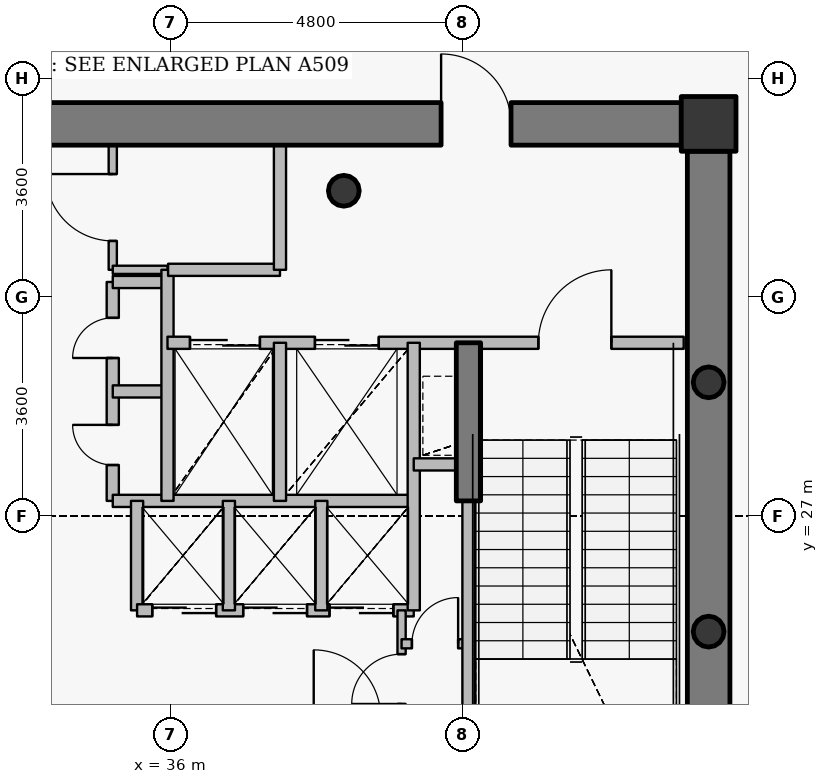
"""IFC4 building model, lengths in metres.
Left out: names, types, materials, properties, quantities, classifications, styles, units other than length and angle.
Written with IfcOpenShell. Run it as: python <this file> out.ifc"""

import sys

from ifc_helpers import new_model, si_unit, direction, frame, frame_2d, origin, origin_2d, place, context, subcontext, project, spatial, rectangle, hollow_circle, extrude, source, transform, mapped, element, fill, save


model = new_model("IFC4")
c1 = context("Model", 3, precision=1e-05, world=origin(), true_north=direction((0.0, 1.0)))
c2 = subcontext(c1, "Body", "Model", "MODEL_VIEW")
j1 = project(units=[si_unit("LENGTHUNIT", "METRE"), si_unit("PLANEANGLEUNIT", "RADIAN")], contexts=[c1])
p1 = place(None, origin())
s1 = spatial("IfcSite", under=j1, at=p1, CompositionType="ELEMENT")
p2 = place(p1, origin())
s2 = spatial("IfcBuilding", under=s1, at=p2, CompositionType="ELEMENT")
p3 = place(p2, frame((0.0, 0.0, 324.0)))
s3 = spatial("IfcBuildingStorey", under=s2, at=p3, CompositionType="ELEMENT", Elevation=324.0)
p4 = place(p3, frame((44.85, 33.45, 0.0), z_axis=(0.0, 0.0, 1.0), x_axis=(1.0, 0.0, 0.0)))
e1 = element("IfcColumn", 1, at=p4, inside=s3, PredefinedType="COLUMN", context=c2, shape_type="SweptSolid", body=[
    extrude(rectangle(XDim=0.9, YDim=0.9, at=origin_2d()), origin(), (0.0, 0.0, 1.0), 3.8),
])
p5 = place(p3, frame((38.85, 32.35, 0.0), z_axis=(0.0, 0.0, 1.0), x_axis=(1.0, 0.0, 0.0)))
e2 = element("IfcColumn", 2, at=p5, inside=s3, PredefinedType="COLUMN", context=c2, shape_type="SweptSolid", body=[
    extrude(hollow_circle(Radius=0.254, WallThickness=0.02, at=origin_2d()), origin(), (0.0, 0.0, 1.0), 3.8),
])
p6 = place(p3, frame((27.6, 33.45, 0.0), z_axis=(0.0, 0.0, 1.0), x_axis=(1.0, 0.0, 0.0)))
e3 = element("IfcWall", 3, at=p6, inside=s3, PredefinedType="SHEAR", context=c2, shape_type="SweptSolid", body=[
    extrude(rectangle(XDim=16.8, YDim=0.7, at=frame_2d((8.4, 0.0))), origin(), (0.0, 0.0, 1.0), 3.1),
])
p7 = place(p6, frame((12.85, 0.0, 0.0)))
e4 = element("IfcOpeningElement", 4, at=p7, cuts=e3, PredefinedType="OPENING", context=c2, shape_type="SweptSolid", body=[
    extrude(rectangle(XDim=1.15, YDim=2.15, at=origin_2d()), frame((0.575, 0.36, 1.075), z_axis=(0.0, -1.0, 0.0), x_axis=(1.0, 0.0, 0.0)), (0.0, 0.0, 1.0), 0.72),
])
p8 = place(p3, frame((44.85, 33.0, 0.0), z_axis=(0.0, 0.0, 1.0), x_axis=(0.0, -1.0, 0.0)))
e5 = element("IfcWall", 5, at=p8, inside=s3, PredefinedType="SHEAR", context=c2, shape_type="SweptSolid", body=[
    extrude(rectangle(XDim=12.0, YDim=0.7, at=frame_2d((6.0, 0.0))), origin(), (0.0, 0.0, 1.0), 3.1),
])
p9 = place(p3, frame((40.9, 27.25, 0.0), z_axis=(0.0, 0.0, 1.0), x_axis=(0.0, 1.0, 0.0)))
e6 = element("IfcWall", 6, at=p9, inside=s3, PredefinedType="SHEAR", context=c2, shape_type="SweptSolid", body=[
    extrude(rectangle(XDim=2.6, YDim=0.4, at=frame_2d((1.3, 0.0))), origin(), (0.0, 0.0, 1.0), 3.15),
])
for number, where, z_axis, x_axis in (
    (7, (44.85, 25.1, 0.0), (0.0, 0.0, 1.0), (1.0, 0.0, 0.0)),
    (8, (44.85, 29.2, 0.0), (0.0, 0.0, 1.0), (1.0, 0.0, 0.0)),
):
    element("IfcColumn", number, at=place(p3, frame(where, z_axis=z_axis, x_axis=x_axis)), inside=s3, PredefinedType="COLUMN", context=c2, shape_type="SweptSolid", body=[
        extrude(hollow_circle(Radius=0.254, WallThickness=0.02, at=origin_2d()), origin(), (0.0, 0.0, 1.0), 3.8),
    ])
p10 = place(p3, frame((35.05, 27.25, 0.0), z_axis=(0.0, 0.0, 1.0), x_axis=(0.0, 1.0, 0.0)))
e9 = element("IfcWall", 9, at=p10, inside=s3, PredefinedType="PARTITIONING", context=c2, shape_type="SweptSolid", body=[
    extrude(rectangle(XDim=3.6, YDim=0.2, at=frame_2d((1.8, 0.0))), origin(), (0.0, 0.0, 1.0), 3.55),
])
p11 = place(p10, frame((0.59, 0.0, 0.0)))
e10 = element("IfcOpeningElement", 10, at=p11, cuts=e9, PredefinedType="OPENING", context=c2, shape_type="SweptSolid", body=[
    extrude(rectangle(XDim=0.66, YDim=2.05, at=origin_2d()), frame((0.33, 0.11, 1.025), z_axis=(0.0, -1.0, 0.0), x_axis=(1.0, 0.0, 0.0)), (0.0, 0.0, 1.0), 0.22),
])
p12 = place(p10, frame((2.35, 0.0, 0.0)))
e11 = element("IfcOpeningElement", 11, at=p12, cuts=e9, PredefinedType="OPENING", context=c2, shape_type="SweptSolid", body=[
    extrude(rectangle(XDim=0.66, YDim=2.05, at=origin_2d()), frame((0.33, 0.11, 1.025), z_axis=(0.0, -1.0, 0.0), x_axis=(1.0, 0.0, 0.0)), (0.0, 0.0, 1.0), 0.22),
])
p13 = place(p3, frame((35.05, 27.25, 0.0), z_axis=(0.0, 0.0, 1.0), x_axis=(1.0, 0.0, 0.0)))
e12 = element("IfcWall", 12, at=p13, inside=s3, PredefinedType="PARTITIONING", context=c2, shape_type="SweptSolid", body=[
    extrude(rectangle(XDim=4.95, YDim=0.2, at=frame_2d((2.475, 0.0))), origin(), (0.0, 0.0, 1.0), 3.135),
])
for number, where, z_axis, x_axis in (
    (13, (35.05, 29.05, 0.0), (0.0, 0.0, 1.0), (1.0, 0.0, 0.0)),
    (14, (35.05, 30.85, 0.0), (0.0, 0.0, 1.0), (1.0, 0.0, 0.0)),
):
    element("IfcWall", number, at=place(p3, frame(where, z_axis=z_axis, x_axis=x_axis)), inside=s3, PredefinedType="PARTITIONING", context=c2, shape_type="SweptSolid", body=[
        extrude(rectangle(XDim=0.9, YDim=0.2, at=frame_2d((0.45, 0.0))), origin(), (0.0, 0.0, 1.0), 3.55),
    ])
p14 = place(p3, frame((35.05, 31.05, 0.0), z_axis=(0.0, 0.0, 1.0), x_axis=(0.0, 1.0, 0.0)))
e15 = element("IfcWall", 15, at=p14, inside=s3, PredefinedType="PARTITIONING", context=c2, shape_type="SweptSolid", body=[
    extrude(rectangle(XDim=2.05, YDim=0.135, at=frame_2d((1.025, 0.0))), origin(), (0.0, 0.0, 1.0), 3.135),
])
p15 = place(p14, frame((0.475, 0.0, 0.0)))
e16 = element("IfcOpeningElement", 16, at=p15, cuts=e15, PredefinedType="OPENING", context=c2, shape_type="SweptSolid", body=[
    extrude(rectangle(XDim=1.1, YDim=2.15, at=origin_2d()), frame((0.55, 0.078, 1.075), z_axis=(0.0, -1.0, 0.0), x_axis=(1.0, 0.0, 0.0)), (0.0, 0.0, 1.0), 0.155),
])
p16 = place(p3, frame((35.05, 31.05, 0.0), z_axis=(0.0, 0.0, 1.0), x_axis=(1.0, 0.0, 0.0)))
e17 = element("IfcWall", 17, at=p16, inside=s3, PredefinedType="PARTITIONING", context=c2, shape_type="SweptSolid", body=[
    extrude(rectangle(XDim=0.9, YDim=0.135, at=frame_2d((0.45, 0.0))), origin(), (0.0, 0.0, 1.0), 3.55),
])
p17 = place(p3, frame((35.45, 25.45, 0.0), z_axis=(0.0, 0.0, 1.0), x_axis=(0.0, 1.0, 0.0)))
e18 = element("IfcWall", 18, at=p17, inside=s3, PredefinedType="PARTITIONING", context=c2, shape_type="SweptSolid", body=[
    extrude(rectangle(XDim=1.8, YDim=0.2, at=frame_2d((0.9, 0.0))), origin(), (0.0, 0.0, 1.0), 3.55),
])
p18 = place(p3, frame((35.45, 25.45, 0.0), z_axis=(0.0, 0.0, 1.0), x_axis=(1.0, 0.0, 0.0)))
e19 = element("IfcWall", 19, at=p18, inside=s3, PredefinedType="PARTITIONING", context=c2, shape_type="SweptSolid", body=[
    extrude(rectangle(XDim=4.55, YDim=0.2, at=frame_2d((2.275, 0.0))), origin(), (0.0, 0.0, 1.0), 3.135),
])
p19 = place(p18, frame((0.25, 0.0, 0.0)))
e20 = element("IfcOpeningElement", 20, at=p19, cuts=e19, PredefinedType="OPENING", context=c2, shape_type="SweptSolid", body=[
    extrude(rectangle(XDim=1.05, YDim=2.15, at=origin_2d()), frame((0.525, 0.11, 1.075), z_axis=(0.0, -1.0, 0.0), x_axis=(1.0, 0.0, 0.0)), (0.0, 0.0, 1.0), 0.22),
])
p20 = place(p18, frame((1.745, 0.0, 0.0)))
e21 = element("IfcOpeningElement", 21, at=p20, cuts=e19, PredefinedType="OPENING", context=c2, shape_type="SweptSolid", body=[
    extrude(rectangle(XDim=1.05, YDim=2.15, at=origin_2d()), frame((0.525, 0.11, 1.075), z_axis=(0.0, -1.0, 0.0), x_axis=(1.0, 0.0, 0.0)), (0.0, 0.0, 1.0), 0.22),
])
p21 = place(p18, frame((3.165, 0.0, 0.0)))
e22 = element("IfcOpeningElement", 22, at=p21, cuts=e19, PredefinedType="OPENING", context=c2, shape_type="SweptSolid", body=[
    extrude(rectangle(XDim=1.05, YDim=2.15, at=origin_2d()), frame((0.525, 0.11, 1.075), z_axis=(0.0, -1.0, 0.0), x_axis=(1.0, 0.0, 0.0)), (0.0, 0.0, 1.0), 0.22),
])
p22 = place(p3, frame((35.95, 27.25, 0.0), z_axis=(0.0, 0.0, 1.0), x_axis=(0.0, 1.0, 0.0)))
e23 = element("IfcWall", 23, at=p22, inside=s3, PredefinedType="PARTITIONING", context=c2, shape_type="SweptSolid", body=[
    extrude(rectangle(XDim=3.8, YDim=0.2, at=frame_2d((1.9, 0.0))), origin(), (0.0, 0.0, 1.0), 3.55),
])
p23 = place(p3, frame((35.95, 29.85, 0.0), z_axis=(0.0, 0.0, 1.0), x_axis=(1.0, 0.0, 0.0)))
e24 = element("IfcWall", 24, at=p23, inside=s3, PredefinedType="PARTITIONING", context=c2, shape_type="SweptSolid", body=[
    extrude(rectangle(XDim=8.49, YDim=0.2, at=frame_2d((4.245, 0.0))), origin(), (0.0, 0.0, 1.0), 3.135),
])
p24 = place(p23, frame((6.1, 0.0, 0.0)))
e25 = element("IfcOpeningElement", 25, at=p24, cuts=e24, PredefinedType="OPENING", context=c2, shape_type="SweptSolid", body=[
    extrude(rectangle(XDim=1.2, YDim=2.15, at=origin_2d()), frame((0.6, 0.11, 1.075), z_axis=(0.0, -1.0, 0.0), x_axis=(1.0, 0.0, 0.0)), (0.0, 0.0, 1.0), 0.22),
])
p25 = place(p23, frame((0.37, 0.0, 0.0)))
e26 = element("IfcOpeningElement", 26, at=p25, cuts=e24, PredefinedType="OPENING", context=c2, shape_type="SweptSolid", body=[
    extrude(rectangle(XDim=1.15, YDim=2.15, at=origin_2d()), frame((0.575, 0.11, 1.075), z_axis=(0.0, -1.0, 0.0), x_axis=(1.0, 0.0, 0.0)), (0.0, 0.0, 1.0), 0.22),
])
p26 = place(p23, frame((2.425, 0.0, 0.0)))
e27 = element("IfcOpeningElement", 27, at=p26, cuts=e24, PredefinedType="OPENING", context=c2, shape_type="SweptSolid", body=[
    extrude(rectangle(XDim=1.05, YDim=2.15, at=origin_2d()), frame((0.525, 0.11, 1.075), z_axis=(0.0, -1.0, 0.0), x_axis=(1.0, 0.0, 0.0)), (0.0, 0.0, 1.0), 0.22),
])
p27 = place(p3, frame((35.96, 31.05, 0.0), z_axis=(0.0, 0.0, 1.0), x_axis=(1.0, 0.0, 0.0)))
e28 = element("IfcWall", 28, at=p27, inside=s3, PredefinedType="PARTITIONING", context=c2, shape_type="SweptSolid", body=[
    extrude(rectangle(XDim=1.84, YDim=0.2, at=frame_2d((0.92, 0.0))), origin(), (0.0, 0.0, 1.0), 3.55),
])
p28 = place(p3, frame((36.96, 25.45, 0.0), z_axis=(0.0, 0.0, 1.0), x_axis=(0.0, 1.0, 0.0)))
e29 = element("IfcWall", 29, at=p28, inside=s3, PredefinedType="PARTITIONING", context=c2, shape_type="SweptSolid", body=[
    extrude(rectangle(XDim=1.8, YDim=0.2, at=frame_2d((0.9, 0.0))), origin(), (0.0, 0.0, 1.0), 3.55),
])
p29 = place(p3, frame((37.8, 27.25, 0.0), z_axis=(0.0, 0.0, 1.0), x_axis=(0.0, 1.0, 0.0)))
e30 = element("IfcWall", 30, at=p29, inside=s3, PredefinedType="PARTITIONING", context=c2, shape_type="SweptSolid", body=[
    extrude(rectangle(XDim=2.6, YDim=0.2, at=frame_2d((1.3, 0.0))), origin(), (0.0, 0.0, 1.0), 3.55),
])
p30 = place(p3, frame((37.8, 31.05, 0.0), z_axis=(0.0, 0.0, 1.0), x_axis=(0.0, 1.0, 0.0)))
e31 = element("IfcWall", 31, at=p30, inside=s3, PredefinedType="PARTITIONING", context=c2, shape_type="SweptSolid", body=[
    extrude(rectangle(XDim=2.05, YDim=0.2, at=frame_2d((1.025, 0.0))), origin(), (0.0, 0.0, 1.0), 3.135),
])
p31 = place(p3, frame((38.48, 25.45, 0.0), z_axis=(0.0, 0.0, 1.0), x_axis=(0.0, 1.0, 0.0)))
e32 = element("IfcWall", 32, at=p31, inside=s3, PredefinedType="PARTITIONING", context=c2, shape_type="SweptSolid", body=[
    extrude(rectangle(XDim=1.8, YDim=0.2, at=frame_2d((0.9, 0.0))), origin(), (0.0, 0.0, 1.0), 3.55),
])
p32 = place(p3, frame((39.8, 23.7, 0.0), z_axis=(0.0, 0.0, 1.0), x_axis=(0.0, 1.0, 0.0)))
e33 = element("IfcWall", 33, at=p32, inside=s3, PredefinedType="PARTITIONING", context=c2, shape_type="SweptSolid", body=[
    extrude(rectangle(XDim=1.75, YDim=0.135, at=frame_2d((0.875, 0.0))), origin(), (0.0, 0.0, 1.0), 3.55),
])
p33 = place(p32, frame((0.21, 0.0, 0.0)))
e34 = element("IfcOpeningElement", 34, at=p33, cuts=e33, PredefinedType="OPENING", context=c2, shape_type="SweptSolid", body=[
    extrude(rectangle(XDim=0.82, YDim=2.1, at=origin_2d()), frame((0.41, 0.078, 1.05), z_axis=(0.0, -1.0, 0.0), x_axis=(1.0, 0.0, 0.0)), (0.0, 0.0, 1.0), 0.155),
])
p34 = place(p3, frame((39.8, 24.9, 0.0), z_axis=(0.0, 0.0, 1.0), x_axis=(1.0, 0.0, 0.0)))
e35 = element("IfcWall", 35, at=p34, inside=s3, PredefinedType="PARTITIONING", context=c2, shape_type="SweptSolid", body=[
    extrude(rectangle(XDim=1.1, YDim=0.15, at=frame_2d((0.55, 0.0))), origin(), (0.0, 0.0, 1.0), 3.55),
])
p35 = place(p34, frame((0.17, 0.0, 0.0)))
e36 = element("IfcOpeningElement", 36, at=p35, cuts=e35, PredefinedType="OPENING", context=c2, shape_type="SweptSolid", body=[
    extrude(rectangle(XDim=0.76, YDim=2.1, at=origin_2d()), frame((0.38, 0.085, 1.05), z_axis=(0.0, -1.0, 0.0), x_axis=(1.0, 0.0, 0.0)), (0.0, 0.0, 1.0), 0.17),
])
p36 = place(p3, frame((40.0, 25.45, 0.0), z_axis=(0.0, 0.0, 1.0), x_axis=(0.0, 1.0, 0.0)))
e37 = element("IfcWall", 37, at=p36, inside=s3, PredefinedType="PARTITIONING", context=c2, shape_type="SweptSolid", body=[
    extrude(rectangle(XDim=4.4, YDim=0.2, at=frame_2d((2.2, 0.0))), origin(), (0.0, 0.0, 1.0), 3.55),
])
p37 = place(p3, frame((40.0, 27.85, 0.0), z_axis=(0.0, 0.0, 1.0), x_axis=(1.0, 0.0, 0.0)))
e38 = element("IfcWall", 38, at=p37, inside=s3, PredefinedType="PARTITIONING", context=c2, shape_type="SweptSolid", body=[
    extrude(rectangle(XDim=0.9, YDim=0.2, at=frame_2d((0.45, 0.0))), origin(), (0.0, 0.0, 1.0), 3.55),
])
p38 = place(p3, frame((40.9, 21.33, 0.0), z_axis=(0.0, 0.0, 1.0), x_axis=(0.0, 1.0, 0.0)))
e39 = element("IfcWall", 39, at=p38, inside=s3, PredefinedType="PARTITIONING", context=c2, shape_type="SweptSolid", body=[
    extrude(rectangle(XDim=5.91, YDim=0.2, at=frame_2d((2.955, 0.0))), origin(), (0.0, 0.0, 1.0), 3.085),
])
p39 = place(p3, frame((45.2, 33.8, 0.0), z_axis=(0.0, 0.0, 1.0), x_axis=(-1.0, 0.0, 0.0)))
e40 = element("IfcWall", 40, at=p39, inside=s3, PredefinedType="PARTITIONING", context=c2, shape_type="SweptSolid", body=[
    extrude(rectangle(XDim=0.79, YDim=0.135, at=frame_2d((0.395, 0.0))), origin(), (0.0, 0.0, 1.0), 3.085),
])
p40 = place(p3, frame((45.2, 33.01, 0.0), z_axis=(0.0, 0.0, 1.0), x_axis=(0.0, 1.0, 0.0)))
e41 = element("IfcWall", 41, at=p40, inside=s3, PredefinedType="PARTITIONING", context=c2, shape_type="SweptSolid", body=[
    extrude(rectangle(XDim=0.482, YDim=0.135, at=frame_2d((0.241, 0.0))), origin(), (0.0, 0.0, 1.0), 3.55),
])
m1 = source(origin(), c2, "Body", "SweptSolid", [
    extrude(rectangle(XDim=1.15, YDim=2.15, at=origin_2d()), frame((0.575, 0.025, 1.075), z_axis=(0.0, -1.0, 0.0), x_axis=(1.0, 0.0, 0.0)), (0.0, 0.0, 1.0), 0.05),
])
p41 = place(p7, origin())
e42 = element("IfcDoor", 42, at=p41, inside=s3, OperationType="SINGLE_SWING_LEFT", PredefinedType="DOOR", context=c2, shape_type="MappedRepresentation", body=[
    mapped(m1, transform((0.0, 0.0, 0.0), x_axis=(1.0, 0.0, 0.0), y_axis=(0.0, 1.0, 0.0), z_axis=(0.0, 0.0, 1.0), scale=1.0)),
])
fill(e4, e42)
m2 = source(origin(), c2, "Body", "SweptSolid", [
    extrude(rectangle(XDim=1.2, YDim=2.15, at=origin_2d()), frame((0.6, 0.025, 1.075), z_axis=(0.0, -1.0, 0.0), x_axis=(1.0, 0.0, 0.0)), (0.0, 0.0, 1.0), 0.05),
])
p42 = place(p24, origin())
e43 = element("IfcDoor", 43, at=p42, inside=s3, OperationType="SINGLE_SWING_RIGHT", PredefinedType="DOOR", context=c2, shape_type="MappedRepresentation", body=[
    mapped(m2, transform((0.0, 0.0, 0.0), x_axis=(1.0, 0.0, 0.0), y_axis=(0.0, 1.0, 0.0), z_axis=(0.0, 0.0, 1.0), scale=1.0)),
])
fill(e25, e43)
m3 = source(origin(), c2, "Body", "SweptSolid", [
    extrude(rectangle(XDim=1.15, YDim=2.15, at=origin_2d()), frame((0.575, 0.025, 1.075), z_axis=(0.0, -1.0, 0.0), x_axis=(1.0, 0.0, 0.0)), (0.0, 0.0, 1.0), 0.05),
])
p43 = place(p25, origin())
e44 = element("IfcDoor", 44, at=p43, inside=s3, OperationType="DOUBLE_DOOR_SLIDING", PredefinedType="USERDEFINED", context=c2, shape_type="MappedRepresentation", body=[
    mapped(m3, transform((0.0, 0.0, 0.0), x_axis=(1.0, 0.0, 0.0), y_axis=(0.0, 1.0, 0.0), z_axis=(0.0, 0.0, 1.0), scale=1.0)),
])
fill(e26, e44)
m4 = source(origin(), c2, "Body", "SweptSolid", [
    extrude(rectangle(XDim=1.05, YDim=2.15, at=origin_2d()), frame((0.525, 0.025, 1.075), z_axis=(0.0, -1.0, 0.0), x_axis=(1.0, 0.0, 0.0)), (0.0, 0.0, 1.0), 0.05),
])
p44 = place(p26, origin())
e45 = element("IfcDoor", 45, at=p44, inside=s3, OperationType="DOUBLE_DOOR_SLIDING", PredefinedType="USERDEFINED", context=c2, shape_type="MappedRepresentation", body=[
    mapped(m4, transform((0.0, 0.0, 0.0), x_axis=(1.0, 0.0, 0.0), y_axis=(0.0, 1.0, 0.0), z_axis=(0.0, 0.0, 1.0), scale=1.0)),
])
fill(e27, e45)
p45 = place(p19, origin())
e46 = element("IfcDoor", 46, at=p45, inside=s3, OperationType="DOUBLE_DOOR_SLIDING", PredefinedType="USERDEFINED", context=c2, shape_type="MappedRepresentation", body=[
    mapped(m4, transform((0.0, 0.0, 0.0), x_axis=(1.0, 0.0, 0.0), y_axis=(0.0, 1.0, 0.0), z_axis=(0.0, 0.0, 1.0), scale=1.0)),
])
fill(e20, e46)
p46 = place(p20, origin())
e47 = element("IfcDoor", 47, at=p46, inside=s3, OperationType="DOUBLE_DOOR_SLIDING", PredefinedType="USERDEFINED", context=c2, shape_type="MappedRepresentation", body=[
    mapped(m4, transform((0.0, 0.0, 0.0), x_axis=(1.0, 0.0, 0.0), y_axis=(0.0, 1.0, 0.0), z_axis=(0.0, 0.0, 1.0), scale=1.0)),
])
fill(e21, e47)
p47 = place(p21, origin())
e48 = element("IfcDoor", 48, at=p47, inside=s3, OperationType="DOUBLE_DOOR_SLIDING", PredefinedType="USERDEFINED", context=c2, shape_type="MappedRepresentation", body=[
    mapped(m4, transform((0.0, 0.0, 0.0), x_axis=(1.0, 0.0, 0.0), y_axis=(0.0, 1.0, 0.0), z_axis=(0.0, 0.0, 1.0), scale=1.0)),
])
fill(e22, e48)
m5 = source(origin(), c2, "Body", "SweptSolid", [
    extrude(rectangle(XDim=0.66, YDim=2.05, at=origin_2d()), frame((0.33, 0.025, 1.025), z_axis=(0.0, -1.0, 0.0), x_axis=(1.0, 0.0, 0.0)), (0.0, 0.0, 1.0), 0.05),
])
p48 = place(p11, origin())
e49 = element("IfcDoor", 49, at=p48, inside=s3, OperationType="SINGLE_SWING_RIGHT", PredefinedType="USERDEFINED", context=c2, shape_type="MappedRepresentation", body=[
    mapped(m5, transform((0.0, 0.0, 0.0), x_axis=(1.0, 0.0, 0.0), y_axis=(0.0, 1.0, 0.0), z_axis=(0.0, 0.0, 1.0), scale=1.0)),
])
fill(e10, e49)
p49 = place(p12, origin())
e50 = element("IfcDoor", 50, at=p49, inside=s3, OperationType="SINGLE_SWING_LEFT", PredefinedType="USERDEFINED", context=c2, shape_type="MappedRepresentation", body=[
    mapped(m5, transform((0.0, 0.0, 0.0), x_axis=(1.0, 0.0, 0.0), y_axis=(0.0, 1.0, 0.0), z_axis=(0.0, 0.0, 1.0), scale=1.0)),
])
fill(e11, e50)
m6 = source(origin(), c2, "Body", "SweptSolid", [
    extrude(rectangle(XDim=1.1, YDim=2.15, at=origin_2d()), frame((0.55, 0.025, 1.075), z_axis=(0.0, -1.0, 0.0), x_axis=(1.0, 0.0, 0.0)), (0.0, 0.0, 1.0), 0.05),
])
p50 = place(p15, origin())
e51 = element("IfcDoor", 51, at=p50, inside=s3, OperationType="SINGLE_SWING_RIGHT", PredefinedType="DOOR", context=c2, shape_type="MappedRepresentation", body=[
    mapped(m6, transform((0.0, 0.0, 0.0), x_axis=(1.0, 0.0, 0.0), y_axis=(0.0, 1.0, 0.0), z_axis=(0.0, 0.0, 1.0), scale=1.0)),
])
fill(e16, e51)
m7 = source(origin(), c2, "Body", "SweptSolid", [
    extrude(rectangle(XDim=0.82, YDim=2.1, at=origin_2d()), frame((0.41, 0.025, 1.05), z_axis=(0.0, -1.0, 0.0), x_axis=(1.0, 0.0, 0.0)), (0.0, 0.0, 1.0), 0.05),
])
p51 = place(p33, origin())
e52 = element("IfcDoor", 52, at=p51, inside=s3, OperationType="SINGLE_SWING_LEFT", PredefinedType="DOOR", context=c2, shape_type="MappedRepresentation", body=[
    mapped(m7, transform((0.0, 0.0, 0.0), x_axis=(1.0, 0.0, 0.0), y_axis=(0.0, 1.0, 0.0), z_axis=(0.0, 0.0, 1.0), scale=1.0)),
])
fill(e34, e52)
m8 = source(origin(), c2, "Body", "SweptSolid", [
    extrude(rectangle(XDim=0.76, YDim=2.1, at=origin_2d()), frame((0.38, 0.025, 1.05), z_axis=(0.0, -1.0, 0.0), x_axis=(1.0, 0.0, 0.0)), (0.0, 0.0, 1.0), 0.05),
])
p52 = place(p35, origin())
e53 = element("IfcDoor", 53, at=p52, inside=s3, OperationType="SINGLE_SWING_RIGHT", PredefinedType="DOOR", context=c2, shape_type="MappedRepresentation", body=[
    mapped(m8, transform((0.0, 0.0, 0.0), x_axis=(1.0, 0.0, 0.0), y_axis=(0.0, 1.0, 0.0), z_axis=(0.0, 0.0, 1.0), scale=1.0)),
])
fill(e36, e53)
save(model, sys.argv[1])
